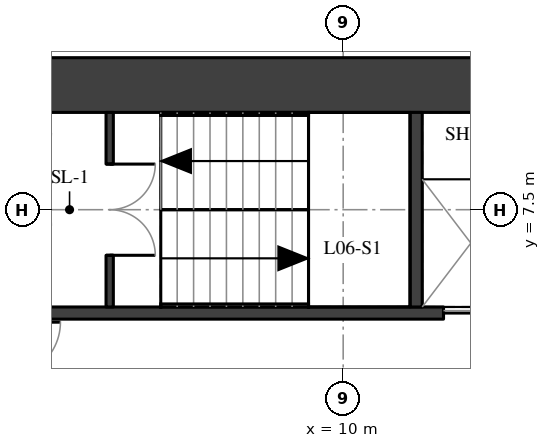
"""IFC4 building model, lengths in metres.
Left out: names, types, materials, properties, quantities, classifications, styles, units other than length and angle.
Written with IfcOpenShell. Run it as: python <this file> out.ifc"""

import sys

from ifc_helpers import new_model, si_unit, direction, frame, frame_2d, origin, place, context, subcontext, project, spatial, rectangle, extrude, element, fill, save


model = new_model("IFC4")
c1 = context("Model", 3, precision=1e-05, world=origin(), true_north=direction((0.0, 1.0)))
c2 = subcontext(c1, "Body", "Model", "MODEL_VIEW")
j1 = project(units=[si_unit("LENGTHUNIT", "METRE"), si_unit("PLANEANGLEUNIT", "RADIAN")], contexts=[c1])
p1 = place(None, origin())
s1 = spatial("IfcSite", under=j1, at=p1, CompositionType="ELEMENT")
p2 = place(p1, origin())
s2 = spatial("IfcBuilding", under=s1, at=p2, CompositionType="ELEMENT")
p3 = place(p2, frame((0.0, 0.0, 28.3)))
s3 = spatial("IfcBuildingStorey", under=s2, at=p3, CompositionType="ELEMENT", Elevation=28.3)
p4 = place(p3, frame((4.9, 9.55, 0.0), z_axis=(0.0, 0.0, 1.0), x_axis=(1.0, 0.0, 0.0)))
e1 = element("IfcWall", 1, at=p4, inside=s3, PredefinedType="SHEAR", context=c2, shape_type="SweptSolid", body=[
    extrude(rectangle(XDim=10.2, YDim=0.9, at=frame_2d((5.1, 0.0))), origin(), (0.0, 0.0, 1.0), 3.02),
])
p5 = place(p3, frame((4.9, 5.8, 0.0), z_axis=(0.0, 0.0, 1.0), x_axis=(1.0, 0.0, 0.0)))
e2 = element("IfcWall", 2, at=p5, inside=s3, PredefinedType="SHEAR", context=c2, shape_type="SweptSolid", body=[
    extrude(rectangle(XDim=10.2, YDim=0.2, at=frame_2d((5.1, 0.0))), origin(), (0.0, 0.0, 1.0), 3.02),
])
p6 = place(p5, frame((6.75, 0.0, 0.0)))
e3 = element("IfcOpeningElement", 3, at=p6, cuts=e2, PredefinedType="OPENING", context=c2, shape_type="SweptSolid", body=[
    extrude(rectangle(XDim=1.1, YDim=2.1, at=frame_2d((0.55, 1.05))), frame((0.0, 0.11, 0.0), z_axis=(0.0, -1.0, 0.0), x_axis=(1.0, 0.0, 0.0)), (0.0, 0.0, 1.0), 0.22),
])
p7 = place(p5, frame((8.75, 0.0, 0.0)))
e4 = element("IfcOpeningElement", 4, at=p7, cuts=e2, PredefinedType="OPENING", context=c2, shape_type="SweptSolid", body=[
    extrude(rectangle(XDim=1.1, YDim=2.1, at=frame_2d((0.55, 1.05))), frame((0.0, 0.11, 0.0), z_axis=(0.0, -1.0, 0.0), x_axis=(1.0, 0.0, 0.0)), (0.0, 0.0, 1.0), 0.22),
])
p8 = place(p3, frame((11.2, 5.9, 0.0), z_axis=(0.0, 0.0, 1.0), x_axis=(0.0, 1.0, 0.0)))
e5 = element("IfcWall", 5, at=p8, inside=s3, PredefinedType="SHEAR", context=c2, shape_type="SweptSolid", body=[
    extrude(rectangle(XDim=3.2, YDim=0.2, at=frame_2d((1.6, 0.0))), origin(), (0.0, 0.0, 1.0), 3.02),
])
p9 = place(p3, frame((6.16, 5.9, 0.0), z_axis=(0.0, 0.0, 1.0), x_axis=(0.0, 1.0, 0.0)))
e6 = element("IfcWall", 6, at=p9, inside=s3, PredefinedType="SHEAR", context=c2, shape_type="SweptSolid", body=[
    extrude(rectangle(XDim=3.2, YDim=0.12, at=frame_2d((1.6, 0.0))), origin(), (0.0, 0.0, 1.0), 3.02),
])
p10 = place(p9, frame((0.85, 0.0, 0.0)))
e7 = element("IfcOpeningElement", 7, at=p10, cuts=e6, PredefinedType="OPENING", context=c2, shape_type="SweptSolid", body=[
    extrude(rectangle(XDim=1.5, YDim=2.1, at=frame_2d((0.75, 1.05))), frame((0.0, 0.07, 0.0), z_axis=(0.0, -1.0, 0.0), x_axis=(1.0, 0.0, 0.0)), (0.0, 0.0, 1.0), 0.14),
])
p11 = place(p10, origin())
e8 = element("IfcDoor", 8, at=p11, inside=s3, OperationType="DOUBLE_DOOR_SINGLE_SWING", PredefinedType="DOOR", context=c2, shape_type="SweptSolid", body=[
    extrude(rectangle(XDim=1.5, YDim=2.1, at=frame_2d((0.75, 1.05))), frame((0.0, 0.025, 0.0), z_axis=(0.0, -1.0, 0.0), x_axis=(1.0, 0.0, 0.0)), (0.0, 0.0, 1.0), 0.05),
])
fill(e7, e8)
p12 = place(p6, origin())
e9 = element("IfcDoor", 9, at=p12, inside=s3, OperationType="DOUBLE_DOOR_SLIDING", PredefinedType="DOOR", context=c2, shape_type="SweptSolid", body=[
    extrude(rectangle(XDim=1.1, YDim=2.1, at=frame_2d((0.55, 1.05))), frame((0.0, 0.025, 0.0), z_axis=(0.0, -1.0, 0.0), x_axis=(1.0, 0.0, 0.0)), (0.0, 0.0, 1.0), 0.05),
])
fill(e3, e9)
save(model, sys.argv[1])
